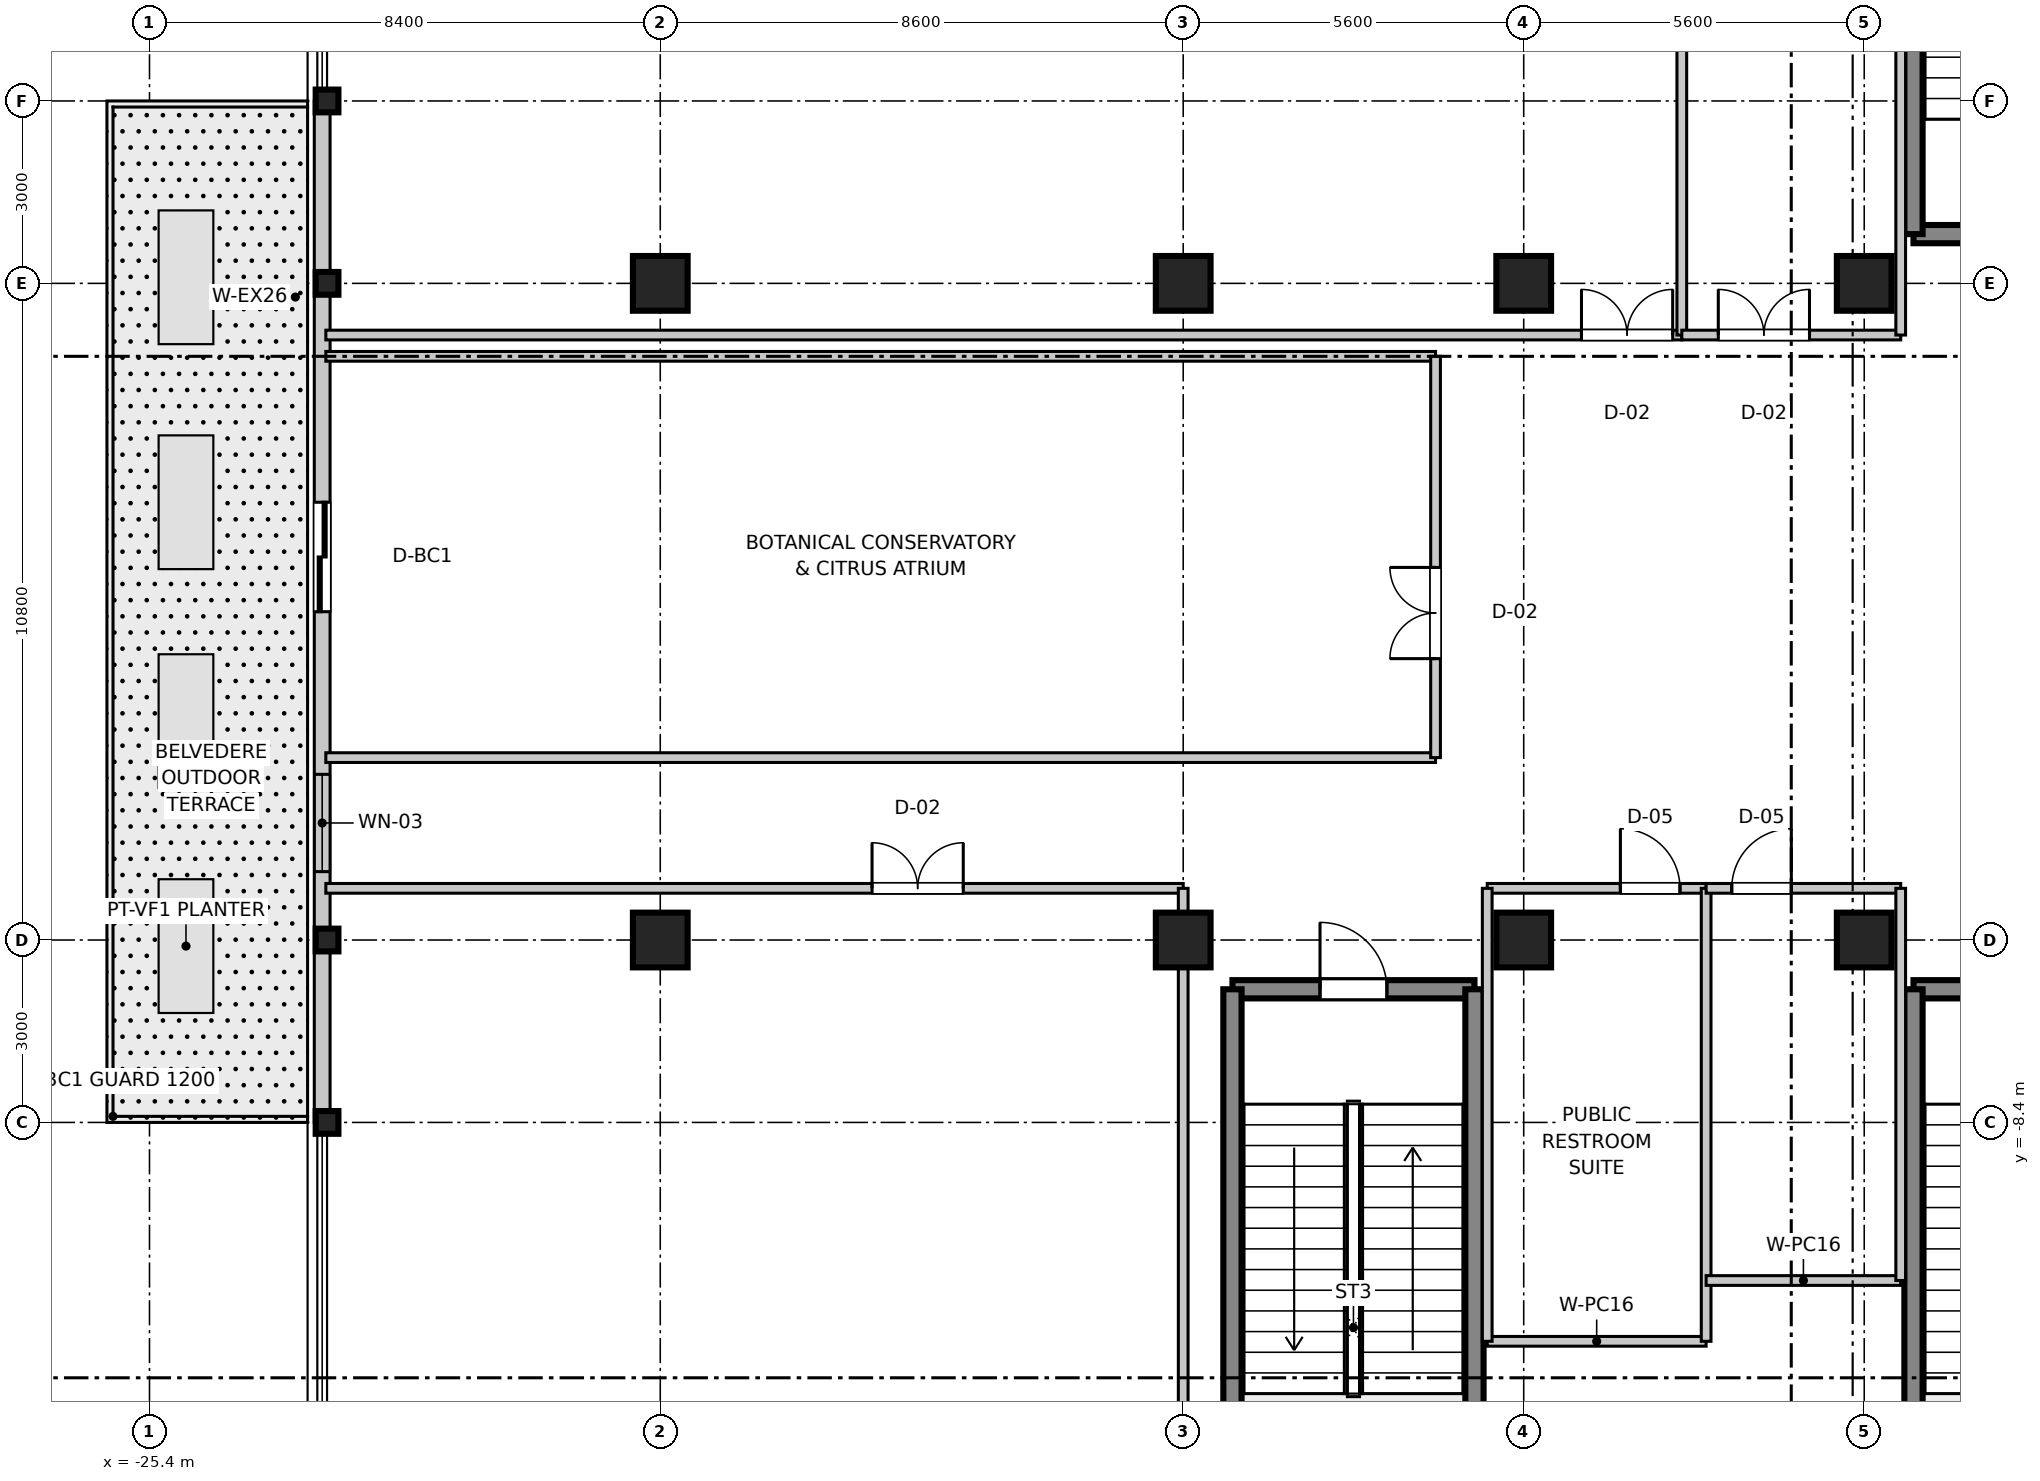
"""IFC4 building model, lengths in metres.
Left out: names, types, materials, properties, quantities, classifications, styles, units other than length and angle.
Written with IfcOpenShell. Run it as: python <this file> out.ifc"""

import sys

from ifc_helpers import new_model, si_unit, direction, frame, frame_2d, origin, origin_2d, place, context, subcontext, project, spatial, rectangle, i_section, extrude, source, transform, mapped, element, fill, save


model = new_model("IFC4")
c1 = context("Model", 3, precision=1e-05, world=origin(), true_north=direction((0.0, 1.0)))
c2 = subcontext(c1, "Body", "Model", "MODEL_VIEW")
j1 = project(units=[si_unit("LENGTHUNIT", "METRE"), si_unit("PLANEANGLEUNIT", "RADIAN")], contexts=[c1])
p1 = place(None, origin())
s1 = spatial("IfcSite", under=j1, at=p1, CompositionType="ELEMENT")
p2 = place(p1, origin())
s2 = spatial("IfcBuilding", under=s1, at=p2, CompositionType="ELEMENT")
p3 = place(p2, frame((0.0, 0.0, 352.05)))
s3 = spatial("IfcBuildingStorey", under=s2, at=p3, CompositionType="ELEMENT", Elevation=352.05)
m1 = source(origin(), c2, "Body", "SweptSolid", [
    extrude(rectangle(XDim=0.9, YDim=0.9, at=origin_2d()), origin(), (0.0, 0.0, 1.0), 4.955),
])
for number, where, z_axis, x_axis in (
    (1, (-17.0, -5.4, 0.0), (0.0, 0.0, 1.0), (1.0, 0.0, 0.0)),
    (2, (-17.0, 5.4, 0.0), (0.0, 0.0, 1.0), (1.0, 0.0, 0.0)),
    (3, (-8.4, -5.4, 0.0), (0.0, 0.0, 1.0), (1.0, 0.0, 0.0)),
    (4, (-8.4, 5.4, 0.0), (0.0, 0.0, 1.0), (1.0, 0.0, 0.0)),
    (5, (-2.8, -5.4, 0.0), (0.0, 0.0, 1.0), (1.0, 0.0, 0.0)),
    (6, (-2.8, 5.4, 0.0), (0.0, 0.0, 1.0), (1.0, 0.0, 0.0)),
    (7, (2.8, -5.4, 0.0), (0.0, 0.0, 1.0), (1.0, 0.0, 0.0)),
    (8, (2.8, 5.4, 0.0), (0.0, 0.0, 1.0), (1.0, 0.0, 0.0)),
):
    element("IfcColumn", number, at=place(p3, frame(where, z_axis=z_axis, x_axis=x_axis)), inside=s3, PredefinedType="COLUMN", context=c2, shape_type="MappedRepresentation", body=[
        mapped(m1, transform((0.0, 0.0, 0.0), scale=1.0)),
    ])
m2 = source(origin(), c2, "Body", "SweptSolid", [
    extrude(i_section(OverallWidth=0.374, OverallDepth=0.374, WebThickness=0.014, FlangeThickness=0.023, at=origin_2d()), origin(), (0.0, 0.0, 1.0), 4.955),
])
for number, where, z_axis, x_axis in (
    (9, (-22.48, -8.4, 0.0), (0.0, 0.0, 1.0), (1.0, 0.0, 0.0)),
    (10, (-22.48, -5.4, 0.0), (0.0, 0.0, 1.0), (1.0, 0.0, 0.0)),
    (11, (-22.48, 5.4, 0.0), (0.0, 0.0, 1.0), (1.0, 0.0, 0.0)),
    (12, (-22.48, 8.4, 0.0), (0.0, 0.0, 1.0), (1.0, 0.0, 0.0)),
):
    element("IfcColumn", number, at=place(p3, frame(where, z_axis=z_axis, x_axis=x_axis)), inside=s3, PredefinedType="COLUMN", context=c2, shape_type="MappedRepresentation", body=[
        mapped(m2, transform((0.0, 0.0, 0.0), scale=1.0)),
    ])
m3 = source(origin(), c2, "Body", "SweptSolid", [
    extrude(rectangle(XDim=3.98, YDim=0.3, at=frame_2d((1.99, 0.0))), origin(), (0.0, 0.0, 1.0), 4.7),
])
p4 = place(p3, frame((3.61, 6.21, 0.0), z_axis=(0.0, 0.0, 1.0), x_axis=(1.0, 0.0, 0.0)))
e13 = element("IfcWall", 13, at=p4, inside=s3, PredefinedType="SHEAR", context=c2, shape_type="MappedRepresentation", body=[
    mapped(m3, transform((0.0, 0.0, 0.0), scale=1.0)),
])
m4 = source(origin(), c2, "Body", "SweptSolid", [
    extrude(rectangle(XDim=9.38, YDim=0.3, at=frame_2d((4.69, 0.0))), origin(), (0.0, 0.0, 1.0), 4.7),
])
p5 = place(p3, frame((3.61, 6.21, 0.0), z_axis=(0.0, 0.0, 1.0), x_axis=(0.0, 1.0, 0.0)))
e14 = element("IfcWall", 14, at=p5, inside=s3, PredefinedType="SHEAR", context=c2, shape_type="MappedRepresentation", body=[
    mapped(m4, transform((0.0, 0.0, 0.0), scale=1.0)),
])
p6 = place(p3, frame((3.61, -6.21, 0.0), z_axis=(0.0, 0.0, 1.0), x_axis=(1.0, 0.0, 0.0)))
e15 = element("IfcWall", 15, at=p6, inside=s3, PredefinedType="SHEAR", context=c2, shape_type="MappedRepresentation", body=[
    mapped(m3, transform((0.0, 0.0, 0.0), scale=1.0)),
])
p7 = place(p3, frame((3.61, -15.59, 0.0), z_axis=(0.0, 0.0, 1.0), x_axis=(0.0, 1.0, 0.0)))
e16 = element("IfcWall", 16, at=p7, inside=s3, PredefinedType="SHEAR", context=c2, shape_type="MappedRepresentation", body=[
    mapped(m4, transform((0.0, 0.0, 0.0), scale=1.0)),
])
p8 = place(p3, frame((-7.59, -6.21, 0.0), z_axis=(0.0, 0.0, 1.0), x_axis=(1.0, 0.0, 0.0)))
e17 = element("IfcWall", 17, at=p8, inside=s3, PredefinedType="SHEAR", context=c2, shape_type="MappedRepresentation", body=[
    mapped(m3, transform((0.0, 0.0, 0.0), scale=1.0)),
])
p9 = place(p8, frame((1.44, 0.0, 0.0)))
e18 = element("IfcOpeningElement", 18, at=p9, cuts=e17, PredefinedType="OPENING", context=c2, shape_type="SweptSolid", body=[
    extrude(rectangle(XDim=1.1, YDim=2.15, at=frame_2d((0.55, 1.075))), frame((0.0, 0.16, 0.0), z_axis=(0.0, -1.0, 0.0), x_axis=(1.0, 0.0, 0.0)), (0.0, 0.0, 1.0), 0.32),
])
for number, where, z_axis, x_axis in (
    (19, (-7.59, -15.59, 0.0), (0.0, 0.0, 1.0), (0.0, 1.0, 0.0)),
    (20, (-3.61, -15.59, 0.0), (0.0, 0.0, 1.0), (0.0, 1.0, 0.0)),
):
    element("IfcWall", number, at=place(p3, frame(where, z_axis=z_axis, x_axis=x_axis)), inside=s3, PredefinedType="SHEAR", context=c2, shape_type="MappedRepresentation", body=[
        mapped(m4, transform((0.0, 0.0, 0.0), scale=1.0)),
    ])
m5 = source(origin(), c2, "Body", "SweptSolid", [
    extrude(rectangle(XDim=16.8, YDim=0.26, at=frame_2d((8.4, 0.0))), origin(), (0.0, 0.0, 1.0), 4.18),
])
p10 = place(p3, frame((-22.56, -8.4, 0.0), z_axis=(0.0, 0.0, 1.0), x_axis=(0.0, 1.0, 0.0)))
e21 = element("IfcWall", 21, at=p10, inside=s3, PredefinedType="STANDARD", context=c2, shape_type="MappedRepresentation", body=[
    mapped(m5, transform((0.0, 0.0, 0.0), scale=1.0)),
])
p11 = place(p10, frame((8.4, 0.0, 0.0)))
e22 = element("IfcOpeningElement", 22, at=p11, cuts=e21, PredefinedType="OPENING", context=c2, shape_type="SweptSolid", body=[
    extrude(rectangle(XDim=1.8, YDim=2.25, at=frame_2d((0.9, 1.125))), frame((0.0, 0.14, 0.0), z_axis=(0.0, -1.0, 0.0), x_axis=(1.0, 0.0, 0.0)), (0.0, 0.0, 1.0), 0.28),
])
p12 = place(p10, frame((4.125, 0.0, 0.85)))
e23 = element("IfcOpeningElement", 23, at=p12, cuts=e21, PredefinedType="OPENING", context=c2, shape_type="SweptSolid", body=[
    extrude(rectangle(XDim=1.6, YDim=1.8, at=frame_2d((0.8, 0.9))), frame((0.0, 0.14, 0.0), z_axis=(0.0, -1.0, 0.0), x_axis=(1.0, 0.0, 0.0)), (0.0, 0.0, 1.0), 0.28),
])
m6 = source(origin(), c2, "Body", "SweptSolid", [
    extrude(rectangle(XDim=18.25, YDim=0.16, at=frame_2d((9.125, 0.0))), origin(), (0.0, 0.0, 1.0), 3.4),
])
for number, where, z_axis, x_axis in (
    (24, (-22.5, -2.4, 0.0), (0.0, 0.0, 1.0), (1.0, 0.0, 0.0)),
    (25, (-22.5, 4.2, 0.0), (0.0, 0.0, 1.0), (1.0, 0.0, 0.0)),
):
    element("IfcWall", number, at=place(p3, frame(where, z_axis=z_axis, x_axis=x_axis)), inside=s3, PredefinedType="PARTITIONING", context=c2, shape_type="MappedRepresentation", body=[
        mapped(m6, transform((0.0, 0.0, 0.0), scale=1.0)),
    ])
m7 = source(origin(), c2, "Body", "SweptSolid", [
    extrude(rectangle(XDim=6.6, YDim=0.16, at=frame_2d((3.3, 0.0))), origin(), (0.0, 0.0, 1.0), 3.4),
])
p13 = place(p3, frame((-4.25, -2.4, 0.0), z_axis=(0.0, 0.0, 1.0), x_axis=(0.0, 1.0, 0.0)))
e26 = element("IfcWall", 26, at=p13, inside=s3, PredefinedType="PARTITIONING", context=c2, shape_type="MappedRepresentation", body=[
    mapped(m7, transform((0.0, 0.0, 0.0), scale=1.0)),
])
p14 = place(p13, frame((1.628, 0.0, 0.0)))
e27 = element("IfcOpeningElement", 27, at=p14, cuts=e26, PredefinedType="OPENING", context=c2, shape_type="SweptSolid", body=[
    extrude(rectangle(XDim=1.5, YDim=2.15, at=frame_2d((0.75, 1.075))), frame((0.0, 0.09, 0.0), z_axis=(0.0, -1.0, 0.0), x_axis=(1.0, 0.0, 0.0)), (0.0, 0.0, 1.0), 0.18),
])
m8 = source(origin(), c2, "Body", "SweptSolid", [
    extrude(rectangle(XDim=22.3, YDim=0.16, at=frame_2d((11.15, 0.0))), origin(), (0.0, 0.0, 1.0), 3.4),
])
p15 = place(p3, frame((-22.5, 4.55, 0.0), z_axis=(0.0, 0.0, 1.0), x_axis=(1.0, 0.0, 0.0)))
e28 = element("IfcWall", 28, at=p15, inside=s3, PredefinedType="PARTITIONING", context=c2, shape_type="MappedRepresentation", body=[
    mapped(m8, transform((0.0, 0.0, 0.0), scale=1.0)),
])
p16 = place(p15, frame((20.65, 0.0, 0.0)))
e29 = element("IfcOpeningElement", 29, at=p16, cuts=e28, PredefinedType="OPENING", context=c2, shape_type="SweptSolid", body=[
    extrude(rectangle(XDim=1.5, YDim=2.15, at=frame_2d((0.75, 1.075))), frame((0.0, 0.09, 0.0), z_axis=(0.0, -1.0, 0.0), x_axis=(1.0, 0.0, 0.0)), (0.0, 0.0, 1.0), 0.18),
])
m9 = source(origin(), c2, "Body", "SweptSolid", [
    extrude(rectangle(XDim=17.95, YDim=0.16, at=frame_2d((8.975, 0.0))), origin(), (0.0, 0.0, 1.0), 3.4),
])
p17 = place(p3, frame((-0.2, 4.55, 0.0), z_axis=(0.0, 0.0, 1.0), x_axis=(0.0, 1.0, 0.0)))
e30 = element("IfcWall", 30, at=p17, inside=s3, PredefinedType="PARTITIONING", context=c2, shape_type="MappedRepresentation", body=[
    mapped(m9, transform((0.0, 0.0, 0.0), scale=1.0)),
])
m10 = source(origin(), c2, "Body", "SweptSolid", [
    extrude(rectangle(XDim=3.6, YDim=0.16, at=frame_2d((1.8, 0.0))), origin(), (0.0, 0.0, 1.0), 3.4),
])
p18 = place(p3, frame((-0.2, 4.55, 0.0), z_axis=(0.0, 0.0, 1.0), x_axis=(1.0, 0.0, 0.0)))
e31 = element("IfcWall", 31, at=p18, inside=s3, PredefinedType="PARTITIONING", context=c2, shape_type="MappedRepresentation", body=[
    mapped(m10, transform((0.0, 0.0, 0.0), scale=1.0)),
])
p19 = place(p18, frame((0.6, 0.0, 0.0)))
e32 = element("IfcOpeningElement", 32, at=p19, cuts=e31, PredefinedType="OPENING", context=c2, shape_type="SweptSolid", body=[
    extrude(rectangle(XDim=1.5, YDim=2.15, at=frame_2d((0.75, 1.075))), frame((0.0, 0.09, 0.0), z_axis=(0.0, -1.0, 0.0), x_axis=(1.0, 0.0, 0.0)), (0.0, 0.0, 1.0), 0.18),
])
p20 = place(p3, frame((3.4, 4.55, 0.0), z_axis=(0.0, 0.0, 1.0), x_axis=(0.0, 1.0, 0.0)))
e33 = element("IfcWall", 33, at=p20, inside=s3, PredefinedType="PARTITIONING", context=c2, shape_type="MappedRepresentation", body=[
    mapped(m9, transform((0.0, 0.0, 0.0), scale=1.0)),
])
m11 = source(origin(), c2, "Body", "SweptSolid", [
    extrude(rectangle(XDim=14.1, YDim=0.16, at=frame_2d((7.05, 0.0))), origin(), (0.0, 0.0, 1.0), 3.4),
])
p21 = place(p3, frame((-22.5, -4.55, 0.0), z_axis=(0.0, 0.0, 1.0), x_axis=(1.0, 0.0, 0.0)))
e34 = element("IfcWall", 34, at=p21, inside=s3, PredefinedType="PARTITIONING", context=c2, shape_type="MappedRepresentation", body=[
    mapped(m11, transform((0.0, 0.0, 0.0), scale=1.0)),
])
p22 = place(p21, frame((8.983, 0.0, 0.0)))
e35 = element("IfcOpeningElement", 35, at=p22, cuts=e34, PredefinedType="OPENING", context=c2, shape_type="SweptSolid", body=[
    extrude(rectangle(XDim=1.5, YDim=2.15, at=frame_2d((0.75, 1.075))), frame((0.0, 0.09, 0.0), z_axis=(0.0, -1.0, 0.0), x_axis=(1.0, 0.0, 0.0)), (0.0, 0.0, 1.0), 0.18),
])
p23 = place(p3, frame((-8.4, -22.5, 0.0), z_axis=(0.0, 0.0, 1.0), x_axis=(0.0, 1.0, 0.0)))
e36 = element("IfcWall", 36, at=p23, inside=s3, PredefinedType="PARTITIONING", context=c2, shape_type="MappedRepresentation", body=[
    mapped(m9, transform((0.0, 0.0, 0.0), scale=1.0)),
])
p24 = place(p3, frame((-3.4, -12.0, 0.0), z_axis=(0.0, 0.0, 1.0), x_axis=(1.0, 0.0, 0.0)))
e37 = element("IfcWall", 37, at=p24, inside=s3, PredefinedType="PARTITIONING", context=c2, shape_type="MappedRepresentation", body=[
    mapped(m10, transform((0.0, 0.0, 0.0), scale=1.0)),
])
p25 = place(p3, frame((-3.4, -4.55, 0.0), z_axis=(0.0, 0.0, 1.0), x_axis=(1.0, 0.0, 0.0)))
e38 = element("IfcWall", 38, at=p25, inside=s3, PredefinedType="PARTITIONING", context=c2, shape_type="MappedRepresentation", body=[
    mapped(m10, transform((0.0, 0.0, 0.0), scale=1.0)),
])
p26 = place(p25, frame((2.19, 0.0, 0.0)))
e39 = element("IfcOpeningElement", 39, at=p26, cuts=e38, PredefinedType="OPENING", context=c2, shape_type="SweptSolid", body=[
    extrude(rectangle(XDim=0.98, YDim=2.1, at=frame_2d((0.49, 1.05))), frame((0.0, 0.09, 0.0), z_axis=(0.0, -1.0, 0.0), x_axis=(1.0, 0.0, 0.0)), (0.0, 0.0, 1.0), 0.18),
])
m12 = source(origin(), c2, "Body", "SweptSolid", [
    extrude(rectangle(XDim=7.45, YDim=0.16, at=frame_2d((3.725, 0.0))), origin(), (0.0, 0.0, 1.0), 3.4),
])
for number, where, z_axis, x_axis in (
    (40, (-3.4, -12.0, 0.0), (0.0, 0.0, 1.0), (0.0, 1.0, 0.0)),
    (41, (0.2, -12.0, 0.0), (0.0, 0.0, 1.0), (0.0, 1.0, 0.0)),
):
    element("IfcWall", number, at=place(p3, frame(where, z_axis=z_axis, x_axis=x_axis)), inside=s3, PredefinedType="PARTITIONING", context=c2, shape_type="MappedRepresentation", body=[
        mapped(m12, transform((0.0, 0.0, 0.0), scale=1.0)),
    ])
m13 = source(origin(), c2, "Body", "SweptSolid", [
    extrude(rectangle(XDim=3.2, YDim=0.16, at=frame_2d((1.6, 0.0))), origin(), (0.0, 0.0, 1.0), 3.4),
])
p27 = place(p3, frame((0.2, -11.0, 0.0), z_axis=(0.0, 0.0, 1.0), x_axis=(1.0, 0.0, 0.0)))
e42 = element("IfcWall", 42, at=p27, inside=s3, PredefinedType="PARTITIONING", context=c2, shape_type="MappedRepresentation", body=[
    mapped(m13, transform((0.0, 0.0, 0.0), scale=1.0)),
])
p28 = place(p3, frame((0.2, -4.55, 0.0), z_axis=(0.0, 0.0, 1.0), x_axis=(1.0, 0.0, 0.0)))
e43 = element("IfcWall", 43, at=p28, inside=s3, PredefinedType="PARTITIONING", context=c2, shape_type="MappedRepresentation", body=[
    mapped(m13, transform((0.0, 0.0, 0.0), scale=1.0)),
])
p29 = place(p28, frame((0.421, 0.0, 0.0)))
e44 = element("IfcOpeningElement", 44, at=p29, cuts=e43, PredefinedType="OPENING", context=c2, shape_type="SweptSolid", body=[
    extrude(rectangle(XDim=0.98, YDim=2.1, at=frame_2d((0.49, 1.05))), frame((0.0, 0.09, 0.0), z_axis=(0.0, -1.0, 0.0), x_axis=(1.0, 0.0, 0.0)), (0.0, 0.0, 1.0), 0.18),
])
m14 = source(origin(), c2, "Body", "SweptSolid", [
    extrude(rectangle(XDim=6.45, YDim=0.16, at=frame_2d((3.225, 0.0))), origin(), (0.0, 0.0, 1.0), 3.4),
])
p30 = place(p3, frame((3.4, -11.0, 0.0), z_axis=(0.0, 0.0, 1.0), x_axis=(0.0, 1.0, 0.0)))
e45 = element("IfcWall", 45, at=p30, inside=s3, PredefinedType="PARTITIONING", context=c2, shape_type="MappedRepresentation", body=[
    mapped(m14, transform((0.0, 0.0, 0.0), scale=1.0)),
])
m15 = source(origin(), c2, "Body", "SweptSolid", [
    extrude(rectangle(XDim=1.1, YDim=2.15, at=frame_2d((0.55, 1.075))), frame((0.0, 0.025, 0.0), z_axis=(0.0, -1.0, 0.0), x_axis=(1.0, 0.0, 0.0)), (0.0, 0.0, 1.0), 0.05),
])
p31 = place(p9, frame((1.1, 0.0, 0.0), z_axis=(0.0, 0.0, 1.0), x_axis=(-1.0, 0.0, 0.0)))
e46 = element("IfcDoor", 46, at=p31, inside=s3, OperationType="SINGLE_SWING_LEFT", PredefinedType="DOOR", context=c2, shape_type="MappedRepresentation", body=[
    mapped(m15, transform((0.0, 0.0, 0.0), scale=1.0)),
])
fill(e18, e46)
m16 = source(origin(), c2, "Body", "SweptSolid", [
    extrude(rectangle(XDim=1.5, YDim=2.15, at=frame_2d((0.75, 1.075))), frame((0.0, 0.025, 0.0), z_axis=(0.0, -1.0, 0.0), x_axis=(1.0, 0.0, 0.0)), (0.0, 0.0, 1.0), 0.05),
])
p32 = place(p14, origin())
e47 = element("IfcDoor", 47, at=p32, inside=s3, OperationType="DOUBLE_DOOR_SINGLE_SWING", PredefinedType="DOOR", context=c2, shape_type="MappedRepresentation", body=[
    mapped(m16, transform((0.0, 0.0, 0.0), scale=1.0)),
])
fill(e27, e47)
p33 = place(p16, origin())
e48 = element("IfcDoor", 48, at=p33, inside=s3, OperationType="DOUBLE_DOOR_SINGLE_SWING", PredefinedType="DOOR", context=c2, shape_type="MappedRepresentation", body=[
    mapped(m16, transform((0.0, 0.0, 0.0), scale=1.0)),
])
fill(e29, e48)
p34 = place(p19, origin())
e49 = element("IfcDoor", 49, at=p34, inside=s3, OperationType="DOUBLE_DOOR_SINGLE_SWING", PredefinedType="DOOR", context=c2, shape_type="MappedRepresentation", body=[
    mapped(m16, transform((0.0, 0.0, 0.0), scale=1.0)),
])
fill(e32, e49)
p35 = place(p22, frame((1.5, 0.0, 0.0), z_axis=(0.0, 0.0, 1.0), x_axis=(-1.0, 0.0, 0.0)))
e50 = element("IfcDoor", 50, at=p35, inside=s3, OperationType="DOUBLE_DOOR_SINGLE_SWING", PredefinedType="DOOR", context=c2, shape_type="MappedRepresentation", body=[
    mapped(m16, transform((0.0, 0.0, 0.0), scale=1.0)),
])
fill(e35, e50)
m17 = source(origin(), c2, "Body", "SweptSolid", [
    extrude(rectangle(XDim=0.98, YDim=2.1, at=frame_2d((0.49, 1.05))), frame((0.0, 0.025, 0.0), z_axis=(0.0, -1.0, 0.0), x_axis=(1.0, 0.0, 0.0)), (0.0, 0.0, 1.0), 0.05),
])
p36 = place(p26, frame((0.98, 0.0, 0.0), z_axis=(0.0, 0.0, 1.0), x_axis=(-1.0, 0.0, 0.0)))
e51 = element("IfcDoor", 51, at=p36, inside=s3, OperationType="SINGLE_SWING_LEFT", PredefinedType="DOOR", context=c2, shape_type="MappedRepresentation", body=[
    mapped(m17, transform((0.0, 0.0, 0.0), scale=1.0)),
])
fill(e39, e51)
p37 = place(p29, frame((0.98, 0.0, 0.0), z_axis=(0.0, 0.0, 1.0), x_axis=(-1.0, 0.0, 0.0)))
e52 = element("IfcDoor", 52, at=p37, inside=s3, OperationType="SINGLE_SWING_RIGHT", PredefinedType="DOOR", context=c2, shape_type="MappedRepresentation", body=[
    mapped(m17, transform((0.0, 0.0, 0.0), scale=1.0)),
])
fill(e44, e52)
m18 = source(origin(), c2, "Body", "SweptSolid", [
    extrude(rectangle(XDim=1.8, YDim=2.25, at=frame_2d((0.9, 1.125))), frame((0.0, 0.025, 0.0), z_axis=(0.0, -1.0, 0.0), x_axis=(1.0, 0.0, 0.0)), (0.0, 0.0, 1.0), 0.05),
])
p38 = place(p11, origin())
e53 = element("IfcDoor", 53, at=p38, inside=s3, OperationType="DOUBLE_DOOR_SLIDING", PredefinedType="DOOR", context=c2, shape_type="MappedRepresentation", body=[
    mapped(m18, transform((0.0, 0.0, 0.0), scale=1.0)),
])
fill(e22, e53)
m19 = source(origin(), c2, "Body", "SweptSolid", [
    extrude(rectangle(XDim=1.6, YDim=1.8, at=frame_2d((0.8, 0.9))), frame((0.0, 0.03, 0.0), z_axis=(0.0, -1.0, 0.0), x_axis=(1.0, 0.0, 0.0)), (0.0, 0.0, 1.0), 0.06),
])
p39 = place(p12, origin())
e54 = element("IfcWindow", 54, at=p39, inside=s3, PartitioningType="SINGLE_PANEL", PredefinedType="WINDOW", context=c2, shape_type="MappedRepresentation", body=[
    mapped(m19, transform((0.0, 0.0, 0.0), scale=1.0)),
])
fill(e23, e54)
save(model, sys.argv[1])
